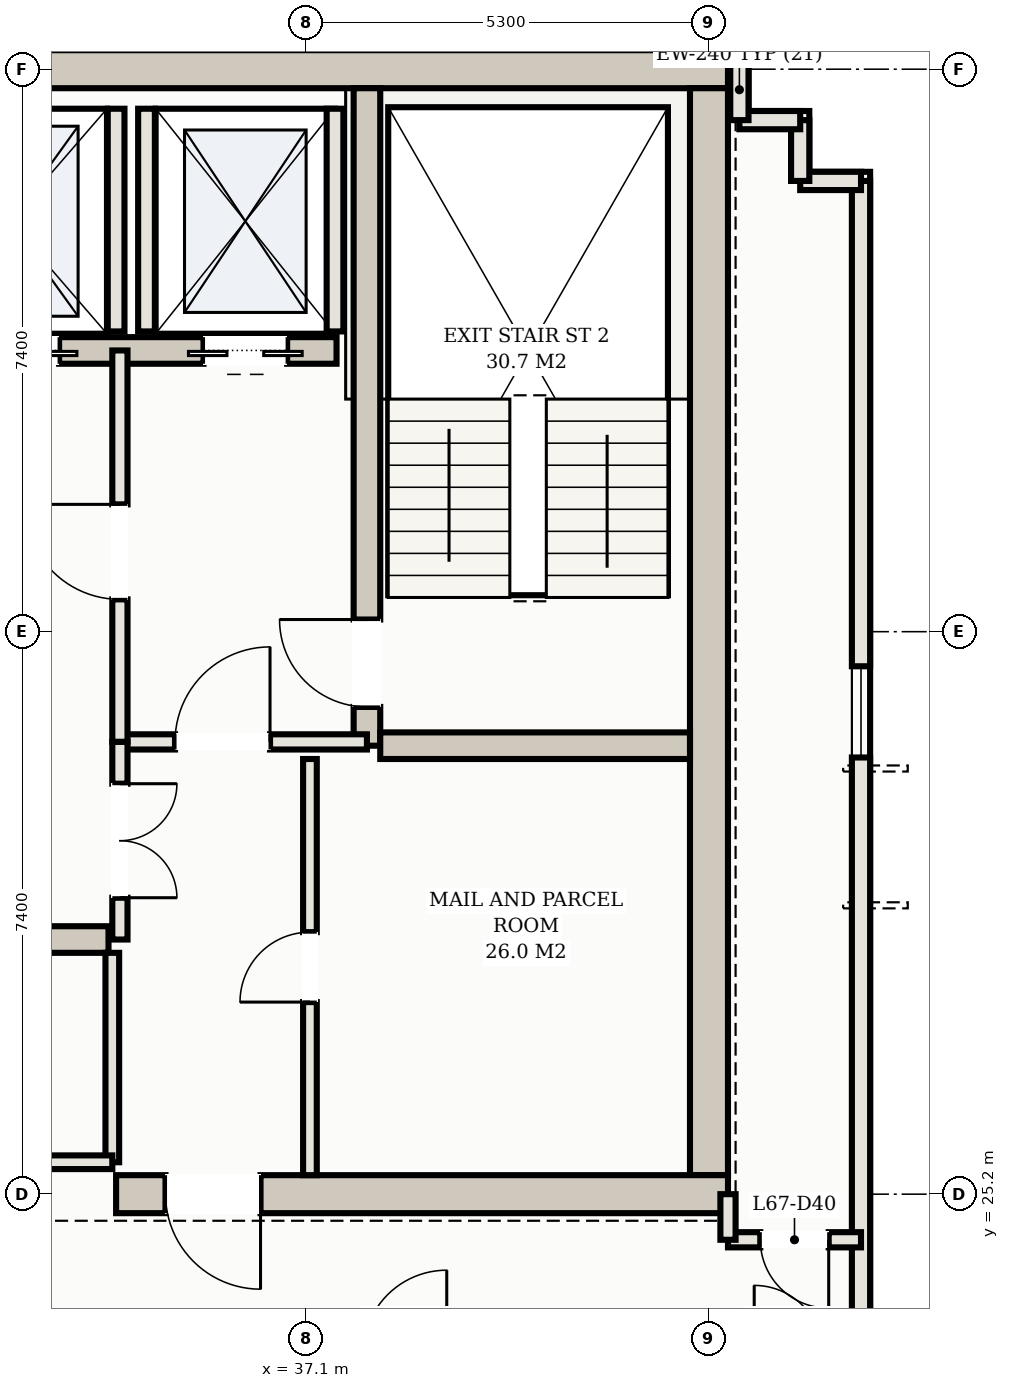
"""IFC4 building model, lengths in metres.
Left out: names, types, materials, properties, quantities, classifications, styles, units other than length and angle.
Written with IfcOpenShell. Run it as: python <this file> out.ifc"""

import sys

from ifc_helpers import new_model, si_unit, direction, frame, frame_2d, origin, place, context, subcontext, project, spatial, rectangle, extrude, element, fill, save


model = new_model("IFC4")
c1 = context("Model", 3, precision=1e-05, world=origin(), true_north=direction((0.0, 1.0)))
c2 = subcontext(c1, "Body", "Model", "MODEL_VIEW")
j1 = project(units=[si_unit("LENGTHUNIT", "METRE"), si_unit("PLANEANGLEUNIT", "RADIAN")], contexts=[c1])
p1 = place(None, origin())
s1 = spatial("IfcSite", under=j1, at=p1, CompositionType="ELEMENT")
p2 = place(p1, origin())
s2 = spatial("IfcBuilding", under=s1, at=p2, CompositionType="ELEMENT")
p3 = place(p2, frame((0.0, 0.0, 242.9)))
s3 = spatial("IfcBuildingStorey", under=s2, at=p3, CompositionType="ELEMENT", Elevation=242.9)
p4 = place(p3, frame((10.35, 40.0, 0.0), z_axis=(0.0, 0.0, 1.0), x_axis=(1.0, 0.0, 0.0)))
e1 = element("IfcWall", 1, at=p4, inside=s3, PredefinedType="SHEAR", context=c2, shape_type="SweptSolid", body=[
    extrude(rectangle(XDim=32.3, YDim=0.5, at=frame_2d((16.15, 0.0))), origin(), (0.0, 0.0, 1.0), 3.11),
])
p5 = place(p3, frame((42.4, 25.45, 0.0), z_axis=(0.0, 0.0, 1.0), x_axis=(0.0, 1.0, 0.0)))
e2 = element("IfcWall", 2, at=p5, inside=s3, PredefinedType="SHEAR", context=c2, shape_type="SweptSolid", body=[
    extrude(rectangle(XDim=14.3, YDim=0.5, at=frame_2d((7.15, 0.0))), origin(), (0.0, 0.0, 1.0), 3.11),
])
p6 = place(p3, frame((34.6, 25.2, 0.0), z_axis=(0.0, 0.0, 1.0), x_axis=(1.0, 0.0, 0.0)))
e3 = element("IfcWall", 3, at=p6, inside=s3, PredefinedType="SHEAR", context=c2, shape_type="SweptSolid", body=[
    extrude(rectangle(XDim=8.05, YDim=0.5, at=frame_2d((4.025, 0.0))), origin(), (0.0, 0.0, 1.0), 3.11),
])
p7 = place(p6, frame((0.65, 0.0, 0.0)))
e4 = element("IfcOpeningElement", 4, at=p7, cuts=e3, PredefinedType="OPENING", context=c2, shape_type="SweptSolid", body=[
    extrude(rectangle(XDim=1.25, YDim=2.2, at=frame_2d((0.625, 1.1))), frame((0.0, 0.26, 0.0), z_axis=(0.0, -1.0, 0.0), x_axis=(1.0, 0.0, 0.0)), (0.0, 0.0, 1.0), 0.52),
])
p8 = place(p3, frame((37.9, 31.1, 0.0), z_axis=(0.0, 0.0, 1.0), x_axis=(0.0, 1.0, 0.0)))
e5 = element("IfcWall", 5, at=p8, inside=s3, PredefinedType="SHEAR", context=c2, shape_type="SweptSolid", body=[
    extrude(rectangle(XDim=8.65, YDim=0.35, at=frame_2d((4.325, 0.0))), origin(), (0.0, 0.0, 1.0), 3.11),
])
p9 = place(p8, frame((0.51, 0.0, 0.0)))
e6 = element("IfcOpeningElement", 6, at=p9, cuts=e5, PredefinedType="OPENING", context=c2, shape_type="SweptSolid", body=[
    extrude(rectangle(XDim=1.15, YDim=2.2, at=frame_2d((0.575, 1.1))), frame((0.0, 0.185, 0.0), z_axis=(0.0, -1.0, 0.0), x_axis=(1.0, 0.0, 0.0)), (0.0, 0.0, 1.0), 0.37),
])
p10 = place(p3, frame((38.075, 31.1, 0.0), z_axis=(0.0, 0.0, 1.0), x_axis=(1.0, 0.0, 0.0)))
e7 = element("IfcWall", 7, at=p10, inside=s3, PredefinedType="SHEAR", context=c2, shape_type="SweptSolid", body=[
    extrude(rectangle(XDim=4.075, YDim=0.35, at=frame_2d((2.038, 0.0))), origin(), (0.0, 0.0, 1.0), 3.11),
])
p11 = place(p3, frame((15.5, 36.3, 0.0), z_axis=(0.0, 0.0, 1.0), x_axis=(1.0, 0.0, 0.0)))
e8 = element("IfcWall", 8, at=p11, inside=s3, PredefinedType="SHEAR", context=c2, shape_type="SweptSolid", body=[
    extrude(rectangle(XDim=22.0, YDim=0.35, at=frame_2d((11.0, 0.0))), origin(), (0.0, 0.0, 1.0), 3.11),
])
p12 = place(p11, frame((0.65, 0.0, 0.0)))
e9 = element("IfcOpeningElement", 9, at=p12, cuts=e8, PredefinedType="OPENING", context=c2, shape_type="SweptSolid", body=[
    extrude(rectangle(XDim=1.1, YDim=2.15, at=frame_2d((0.55, 1.075))), frame((0.0, 0.185, 0.0), z_axis=(0.0, -1.0, 0.0), x_axis=(1.0, 0.0, 0.0)), (0.0, 0.0, 1.0), 0.37),
])
p13 = place(p11, frame((20.25, 0.0, 0.0)))
e10 = element("IfcOpeningElement", 10, at=p13, cuts=e8, PredefinedType="OPENING", context=c2, shape_type="SweptSolid", body=[
    extrude(rectangle(XDim=1.1, YDim=2.15, at=frame_2d((0.55, 1.075))), frame((0.0, 0.185, 0.0), z_axis=(0.0, -1.0, 0.0), x_axis=(1.0, 0.0, 0.0)), (0.0, 0.0, 1.0), 0.37),
])
p14 = place(p11, frame((17.05, 0.0, 0.0)))
e11 = element("IfcOpeningElement", 11, at=p14, cuts=e8, PredefinedType="OPENING", context=c2, shape_type="SweptSolid", body=[
    extrude(rectangle(XDim=1.3, YDim=2.2, at=frame_2d((0.65, 1.1))), frame((0.0, 0.185, 0.0), z_axis=(0.0, -1.0, 0.0), x_axis=(1.0, 0.0, 0.0)), (0.0, 0.0, 1.0), 0.37),
])
p15 = place(p11, frame((3.95, 0.0, 0.0)))
e12 = element("IfcOpeningElement", 12, at=p15, cuts=e8, PredefinedType="OPENING", context=c2, shape_type="SweptSolid", body=[
    extrude(rectangle(XDim=1.1, YDim=2.15, at=frame_2d((0.55, 1.075))), frame((0.0, 0.185, 0.0), z_axis=(0.0, -1.0, 0.0), x_axis=(1.0, 0.0, 0.0)), (0.0, 0.0, 1.0), 0.37),
])
p16 = place(p11, frame((6.55, 0.0, 0.0)))
e13 = element("IfcOpeningElement", 13, at=p16, cuts=e8, PredefinedType="OPENING", context=c2, shape_type="SweptSolid", body=[
    extrude(rectangle(XDim=1.1, YDim=2.15, at=frame_2d((0.55, 1.075))), frame((0.0, 0.185, 0.0), z_axis=(0.0, -1.0, 0.0), x_axis=(1.0, 0.0, 0.0)), (0.0, 0.0, 1.0), 0.37),
])
p17 = place(p11, frame((9.15, 0.0, 0.0)))
e14 = element("IfcOpeningElement", 14, at=p17, cuts=e8, PredefinedType="OPENING", context=c2, shape_type="SweptSolid", body=[
    extrude(rectangle(XDim=1.1, YDim=2.15, at=frame_2d((0.55, 1.075))), frame((0.0, 0.185, 0.0), z_axis=(0.0, -1.0, 0.0), x_axis=(1.0, 0.0, 0.0)), (0.0, 0.0, 1.0), 0.37),
])
p18 = place(p3, frame((18.5, 28.55, 0.0), z_axis=(0.0, 0.0, 1.0), x_axis=(1.0, 0.0, 0.0)))
e15 = element("IfcWall", 15, at=p18, inside=s3, PredefinedType="SHEAR", context=c2, shape_type="SweptSolid", body=[
    extrude(rectangle(XDim=16.0, YDim=0.35, at=frame_2d((8.0, 0.0))), origin(), (0.0, 0.0, 1.0), 3.11),
])
for number, where, z_axis, x_axis in (
    (16, (35.0, 36.55, 0.0), (0.0, 0.0, 1.0), (0.0, 1.0, 0.0)),
    (17, (37.48, 36.55, 0.0), (0.0, 0.0, 1.0), (0.0, 1.0, 0.0)),
    (18, (34.6, 36.55, 0.0), (0.0, 0.0, 1.0), (0.0, 1.0, 0.0)),
):
    element("IfcWall", number, at=place(p3, frame(where, z_axis=z_axis, x_axis=x_axis)), inside=s3, PredefinedType="SOLIDWALL", context=c2, shape_type="SweptSolid", body=[
        extrude(rectangle(XDim=2.93, YDim=0.22, at=frame_2d((1.465, 0.0))), origin(), (0.0, 0.0, 1.0), 3.11),
    ])
p19 = place(p3, frame((44.4, 12.52, 0.0), z_axis=(0.0, 0.0, 1.0), x_axis=(0.0, 1.0, 0.0)))
e19 = element("IfcWall", 19, at=p19, inside=s3, PredefinedType="SOLIDWALL", context=c2, shape_type="SweptSolid", body=[
    extrude(rectangle(XDim=26.01, YDim=0.24, at=frame_2d((13.005, 0.0))), origin(), (0.0, 0.0, 1.0), 3.11),
])
p20 = place(p19, frame((4.48, 0.0, 0.0)))
e20 = element("IfcOpeningElement", 20, at=p20, cuts=e19, PredefinedType="OPENING", context=c2, shape_type="SweptSolid", body=[
    extrude(rectangle(XDim=1.8, YDim=2.2, at=frame_2d((0.9, 1.1))), frame((0.0, 0.13, 0.0), z_axis=(0.0, -1.0, 0.0), x_axis=(1.0, 0.0, 0.0)), (0.0, 0.0, 1.0), 0.26),
])
p21 = place(p19, frame((0.426, 0.0, 0.75)))
e21 = element("IfcOpeningElement", 21, at=p21, cuts=e19, PredefinedType="OPENING", context=c2, shape_type="SweptSolid", body=[
    extrude(rectangle(XDim=1.5, YDim=1.6, at=frame_2d((0.75, 0.8))), frame((0.0, 0.13, 0.0), z_axis=(0.0, -1.0, 0.0), x_axis=(1.0, 0.0, 0.0)), (0.0, 0.0, 1.0), 0.26),
])
p22 = place(p19, frame((2.784, 0.0, 0.75)))
e22 = element("IfcOpeningElement", 22, at=p22, cuts=e19, PredefinedType="OPENING", context=c2, shape_type="SweptSolid", body=[
    extrude(rectangle(XDim=1.2, YDim=1.5, at=frame_2d((0.6, 0.75))), frame((0.0, 0.13, 0.0), z_axis=(0.0, -1.0, 0.0), x_axis=(1.0, 0.0, 0.0)), (0.0, 0.0, 1.0), 0.26),
])
p23 = place(p19, frame((7.81, 0.0, 0.75)))
e23 = element("IfcOpeningElement", 23, at=p23, cuts=e19, PredefinedType="OPENING", context=c2, shape_type="SweptSolid", body=[
    extrude(rectangle(XDim=1.2, YDim=1.5, at=frame_2d((0.6, 0.75))), frame((0.0, 0.13, 0.0), z_axis=(0.0, -1.0, 0.0), x_axis=(1.0, 0.0, 0.0)), (0.0, 0.0, 1.0), 0.26),
])
p24 = place(p19, frame((18.425, 0.0, 0.75)))
e24 = element("IfcOpeningElement", 24, at=p24, cuts=e19, PredefinedType="OPENING", context=c2, shape_type="SweptSolid", body=[
    extrude(rectangle(XDim=1.2, YDim=1.5, at=frame_2d((0.6, 0.75))), frame((0.0, 0.13, 0.0), z_axis=(0.0, -1.0, 0.0), x_axis=(1.0, 0.0, 0.0)), (0.0, 0.0, 1.0), 0.26),
])
p25 = place(p3, frame((44.4, 38.53, 0.0), z_axis=(0.0, 0.0, 1.0), x_axis=(-1.0, 0.0, 0.0)))
e25 = element("IfcWall", 25, at=p25, inside=s3, PredefinedType="SOLIDWALL", context=c2, shape_type="SweptSolid", body=[
    extrude(rectangle(XDim=0.8, YDim=0.24, at=frame_2d((0.4, 0.0))), origin(), (0.0, 0.0, 1.0), 3.11),
])
for number, where, z_axis, x_axis in (
    (26, (43.6, 38.53, 0.0), (0.0, 0.0, 1.0), (0.0, 1.0, 0.0)),
    (27, (43.6, 39.33, 0.0), (0.0, 0.0, 1.0), (-1.0, 0.0, 0.0)),
):
    element("IfcWall", number, at=place(p3, frame(where, z_axis=z_axis, x_axis=x_axis)), inside=s3, PredefinedType="SOLIDWALL", context=c2, shape_type="SweptSolid", body=[
        extrude(rectangle(XDim=0.8, YDim=0.24, at=frame_2d((0.4, 0.0))), origin(), (0.0, 0.0, 1.0), 3.11),
    ])
p26 = place(p3, frame((42.8, 39.33, 0.0), z_axis=(0.0, 0.0, 1.0), x_axis=(0.0, 1.0, 0.0)))
e28 = element("IfcWall", 28, at=p26, inside=s3, PredefinedType="SOLIDWALL", context=c2, shape_type="SweptSolid", body=[
    extrude(rectangle(XDim=0.8, YDim=0.24, at=frame_2d((0.4, 0.0))), origin(), (0.0, 0.0, 1.0), 3.11),
])
p27 = place(p3, frame((34.65, 31.15, 0.0), z_axis=(0.0, 0.0, 1.0), x_axis=(1.0, 0.0, 0.0)))
e29 = element("IfcWall", 29, at=p27, inside=s3, PredefinedType="PARTITIONING", context=c2, shape_type="SweptSolid", body=[
    extrude(rectangle(XDim=3.25, YDim=0.2, at=frame_2d((1.625, 0.0))), origin(), (0.0, 0.0, 1.0), 2.45),
])
p28 = place(p27, frame((0.725, 0.0, 0.0)))
e30 = element("IfcOpeningElement", 30, at=p28, cuts=e29, PredefinedType="OPENING", context=c2, shape_type="SweptSolid", body=[
    extrude(rectangle(XDim=1.25, YDim=2.2, at=frame_2d((0.625, 1.1))), frame((0.0, 0.11, 0.0), z_axis=(0.0, -1.0, 0.0), x_axis=(1.0, 0.0, 0.0)), (0.0, 0.0, 1.0), 0.22),
])
p29 = place(p3, frame((34.65, 31.15, 0.0), z_axis=(0.0, 0.0, 1.0), x_axis=(0.0, 1.0, 0.0)))
e31 = element("IfcWall", 31, at=p29, inside=s3, PredefinedType="PARTITIONING", context=c2, shape_type="SweptSolid", body=[
    extrude(rectangle(XDim=5.15, YDim=0.2, at=frame_2d((2.575, 0.0))), origin(), (0.0, 0.0, 1.0), 2.45),
])
p30 = place(p29, frame((1.875, 0.0, 0.0)))
e32 = element("IfcOpeningElement", 32, at=p30, cuts=e31, PredefinedType="OPENING", context=c2, shape_type="SweptSolid", body=[
    extrude(rectangle(XDim=1.25, YDim=2.2, at=frame_2d((0.625, 1.1))), frame((0.0, 0.11, 0.0), z_axis=(0.0, -1.0, 0.0), x_axis=(1.0, 0.0, 0.0)), (0.0, 0.0, 1.0), 0.22),
])
p31 = place(p3, frame((37.15, 25.45, 0.0), z_axis=(0.0, 0.0, 1.0), x_axis=(0.0, 1.0, 0.0)))
e33 = element("IfcWall", 33, at=p31, inside=s3, PredefinedType="PARTITIONING", context=c2, shape_type="SweptSolid", body=[
    extrude(rectangle(XDim=5.475, YDim=0.18, at=frame_2d((2.738, 0.0))), origin(), (0.0, 0.0, 1.0), 2.45),
])
p32 = place(p31, frame((2.277, 0.0, 0.0)))
e34 = element("IfcOpeningElement", 34, at=p32, cuts=e33, PredefinedType="OPENING", context=c2, shape_type="SweptSolid", body=[
    extrude(rectangle(XDim=0.92, YDim=2.15, at=frame_2d((0.46, 1.075))), frame((0.0, 0.1, 0.0), z_axis=(0.0, -1.0, 0.0), x_axis=(1.0, 0.0, 0.0)), (0.0, 0.0, 1.0), 0.2),
])
p33 = place(p3, frame((34.65, 28.55, 0.0), z_axis=(0.0, 0.0, 1.0), x_axis=(0.0, 1.0, 0.0)))
e35 = element("IfcWall", 35, at=p33, inside=s3, PredefinedType="PARTITIONING", context=c2, shape_type="SweptSolid", body=[
    extrude(rectangle(XDim=2.6, YDim=0.2, at=frame_2d((1.3, 0.0))), origin(), (0.0, 0.0, 1.0), 2.45),
])
p34 = place(p33, frame((0.55, 0.0, 0.0)))
e36 = element("IfcOpeningElement", 36, at=p34, cuts=e35, PredefinedType="OPENING", context=c2, shape_type="SweptSolid", body=[
    extrude(rectangle(XDim=1.5, YDim=2.25, at=frame_2d((0.75, 1.125))), frame((0.0, 0.11, 0.0), z_axis=(0.0, -1.0, 0.0), x_axis=(1.0, 0.0, 0.0)), (0.0, 0.0, 1.0), 0.22),
])
p35 = place(p3, frame((34.55, 25.62, 0.0), z_axis=(0.0, 0.0, 1.0), x_axis=(0.0, 1.0, 0.0)))
e37 = element("IfcWall", 37, at=p35, inside=s3, PredefinedType="PARTITIONING", context=c2, shape_type="SweptSolid", body=[
    extrude(rectangle(XDim=2.755, YDim=0.18, at=frame_2d((1.377, 0.0))), origin(), (0.0, 0.0, 1.0), 2.45),
])
p36 = place(p3, frame((26.65, 25.62, 0.0), z_axis=(0.0, 0.0, 1.0), x_axis=(1.0, 0.0, 0.0)))
e38 = element("IfcWall", 38, at=p36, inside=s3, PredefinedType="PARTITIONING", context=c2, shape_type="SweptSolid", body=[
    extrude(rectangle(XDim=7.9, YDim=0.18, at=frame_2d((3.95, 0.0))), origin(), (0.0, 0.0, 1.0), 2.45),
])
p37 = place(p36, frame((3.34, 0.0, 0.0)))
e39 = element("IfcOpeningElement", 39, at=p37, cuts=e38, PredefinedType="OPENING", context=c2, shape_type="SweptSolid", body=[
    extrude(rectangle(XDim=0.92, YDim=2.15, at=frame_2d((0.46, 1.075))), frame((0.0, 0.1, 0.0), z_axis=(0.0, -1.0, 0.0), x_axis=(1.0, 0.0, 0.0)), (0.0, 0.0, 1.0), 0.2),
])
p38 = place(p3, frame((42.65, 24.6, 0.0), z_axis=(0.0, 0.0, 1.0), x_axis=(1.0, 0.0, 0.0)))
e40 = element("IfcWall", 40, at=p38, inside=s3, PredefinedType="PARTITIONING", context=c2, shape_type="SweptSolid", body=[
    extrude(rectangle(XDim=1.75, YDim=0.2, at=frame_2d((0.875, 0.0))), origin(), (0.0, 0.0, 1.0), 2.45),
])
p39 = place(p38, frame((0.425, 0.0, 0.0)))
e41 = element("IfcOpeningElement", 41, at=p39, cuts=e40, PredefinedType="OPENING", context=c2, shape_type="SweptSolid", body=[
    extrude(rectangle(XDim=0.9, YDim=2.15, at=frame_2d((0.45, 1.075))), frame((0.0, 0.11, 0.0), z_axis=(0.0, -1.0, 0.0), x_axis=(1.0, 0.0, 0.0)), (0.0, 0.0, 1.0), 0.22),
])
p40 = place(p3, frame((42.65, 24.6, 0.0), z_axis=(0.0, 0.0, 1.0), x_axis=(0.0, 1.0, 0.0)))
e42 = element("IfcWall", 42, at=p40, inside=s3, PredefinedType="PARTITIONING", context=c2, shape_type="SweptSolid", body=[
    extrude(rectangle(XDim=0.6, YDim=0.2, at=frame_2d((0.3, 0.0))), origin(), (0.0, 0.0, 1.0), 2.45),
])
p41 = place(p13, frame((1.1, 0.0, 0.0), z_axis=(0.0, 0.0, 1.0), x_axis=(-1.0, 0.0, 0.0)))
e43 = element("IfcDoor", 43, at=p41, inside=s3, OperationType="DOUBLE_DOOR_SLIDING", PredefinedType="DOOR", context=c2, shape_type="SweptSolid", body=[
    extrude(rectangle(XDim=1.1, YDim=2.15, at=frame_2d((0.55, 1.075))), frame((0.0, 0.025, 0.0), z_axis=(0.0, -1.0, 0.0), x_axis=(1.0, 0.0, 0.0)), (0.0, 0.0, 1.0), 0.05),
])
fill(e10, e43)
p42 = place(p14, frame((1.3, 0.0, 0.0), z_axis=(0.0, 0.0, 1.0), x_axis=(-1.0, 0.0, 0.0)))
e44 = element("IfcDoor", 44, at=p42, inside=s3, OperationType="DOUBLE_DOOR_SLIDING", PredefinedType="DOOR", context=c2, shape_type="SweptSolid", body=[
    extrude(rectangle(XDim=1.3, YDim=2.2, at=frame_2d((0.65, 1.1))), frame((0.0, 0.025, 0.0), z_axis=(0.0, -1.0, 0.0), x_axis=(1.0, 0.0, 0.0)), (0.0, 0.0, 1.0), 0.05),
])
fill(e11, e44)
p43 = place(p7, frame((1.25, 0.0, 0.0), z_axis=(0.0, 0.0, 1.0), x_axis=(-1.0, 0.0, 0.0)))
e45 = element("IfcDoor", 45, at=p43, inside=s3, OperationType="SINGLE_SWING_LEFT", PredefinedType="DOOR", context=c2, shape_type="SweptSolid", body=[
    extrude(rectangle(XDim=1.25, YDim=2.2, at=frame_2d((0.625, 1.1))), frame((0.0, 0.025, 0.0), z_axis=(0.0, -1.0, 0.0), x_axis=(1.0, 0.0, 0.0)), (0.0, 0.0, 1.0), 0.05),
])
fill(e4, e45)
p44 = place(p28, origin())
e46 = element("IfcDoor", 46, at=p44, inside=s3, OperationType="SINGLE_SWING_RIGHT", PredefinedType="DOOR", context=c2, shape_type="SweptSolid", body=[
    extrude(rectangle(XDim=1.25, YDim=2.2, at=frame_2d((0.625, 1.1))), frame((0.0, 0.025, 0.0), z_axis=(0.0, -1.0, 0.0), x_axis=(1.0, 0.0, 0.0)), (0.0, 0.0, 1.0), 0.05),
])
fill(e30, e46)
p45 = place(p30, origin())
e47 = element("IfcDoor", 47, at=p45, inside=s3, OperationType="SINGLE_SWING_RIGHT", PredefinedType="DOOR", context=c2, shape_type="SweptSolid", body=[
    extrude(rectangle(XDim=1.25, YDim=2.2, at=frame_2d((0.625, 1.1))), frame((0.0, 0.025, 0.0), z_axis=(0.0, -1.0, 0.0), x_axis=(1.0, 0.0, 0.0)), (0.0, 0.0, 1.0), 0.05),
])
fill(e32, e47)
p46 = place(p9, origin())
e48 = element("IfcDoor", 48, at=p46, inside=s3, OperationType="SINGLE_SWING_RIGHT", PredefinedType="DOOR", context=c2, shape_type="SweptSolid", body=[
    extrude(rectangle(XDim=1.15, YDim=2.2, at=frame_2d((0.575, 1.1))), frame((0.0, 0.025, 0.0), z_axis=(0.0, -1.0, 0.0), x_axis=(1.0, 0.0, 0.0)), (0.0, 0.0, 1.0), 0.05),
])
fill(e6, e48)
p47 = place(p32, origin())
e49 = element("IfcDoor", 49, at=p47, inside=s3, OperationType="SINGLE_SWING_LEFT", PredefinedType="DOOR", context=c2, shape_type="SweptSolid", body=[
    extrude(rectangle(XDim=0.92, YDim=2.15, at=frame_2d((0.46, 1.075))), frame((0.0, 0.025, 0.0), z_axis=(0.0, -1.0, 0.0), x_axis=(1.0, 0.0, 0.0)), (0.0, 0.0, 1.0), 0.05),
])
fill(e34, e49)
p48 = place(p34, frame((1.5, 0.0, 0.0), z_axis=(0.0, 0.0, 1.0), x_axis=(-1.0, 0.0, 0.0)))
e50 = element("IfcDoor", 50, at=p48, inside=s3, OperationType="DOUBLE_DOOR_SINGLE_SWING", PredefinedType="DOOR", context=c2, shape_type="SweptSolid", body=[
    extrude(rectangle(XDim=1.5, YDim=2.25, at=frame_2d((0.75, 1.125))), frame((0.0, 0.025, 0.0), z_axis=(0.0, -1.0, 0.0), x_axis=(1.0, 0.0, 0.0)), (0.0, 0.0, 1.0), 0.05),
])
fill(e36, e50)
p49 = place(p39, frame((0.9, 0.0, 0.0), z_axis=(0.0, 0.0, 1.0), x_axis=(-1.0, 0.0, 0.0)))
e51 = element("IfcDoor", 51, at=p49, inside=s3, OperationType="SINGLE_SWING_LEFT", PredefinedType="DOOR", context=c2, shape_type="SweptSolid", body=[
    extrude(rectangle(XDim=0.9, YDim=2.15, at=frame_2d((0.45, 1.075))), frame((0.0, 0.025, 0.0), z_axis=(0.0, -1.0, 0.0), x_axis=(1.0, 0.0, 0.0)), (0.0, 0.0, 1.0), 0.05),
])
fill(e41, e51)
p50 = place(p24, origin())
e52 = element("IfcWindow", 52, at=p50, inside=s3, PartitioningType="SINGLE_PANEL", PredefinedType="WINDOW", context=c2, shape_type="SweptSolid", body=[
    extrude(rectangle(XDim=1.2, YDim=1.5, at=frame_2d((0.6, 0.75))), frame((0.0, 0.03, 0.0), z_axis=(0.0, -1.0, 0.0), x_axis=(1.0, 0.0, 0.0)), (0.0, 0.0, 1.0), 0.06),
])
fill(e24, e52)
save(model, sys.argv[1])
